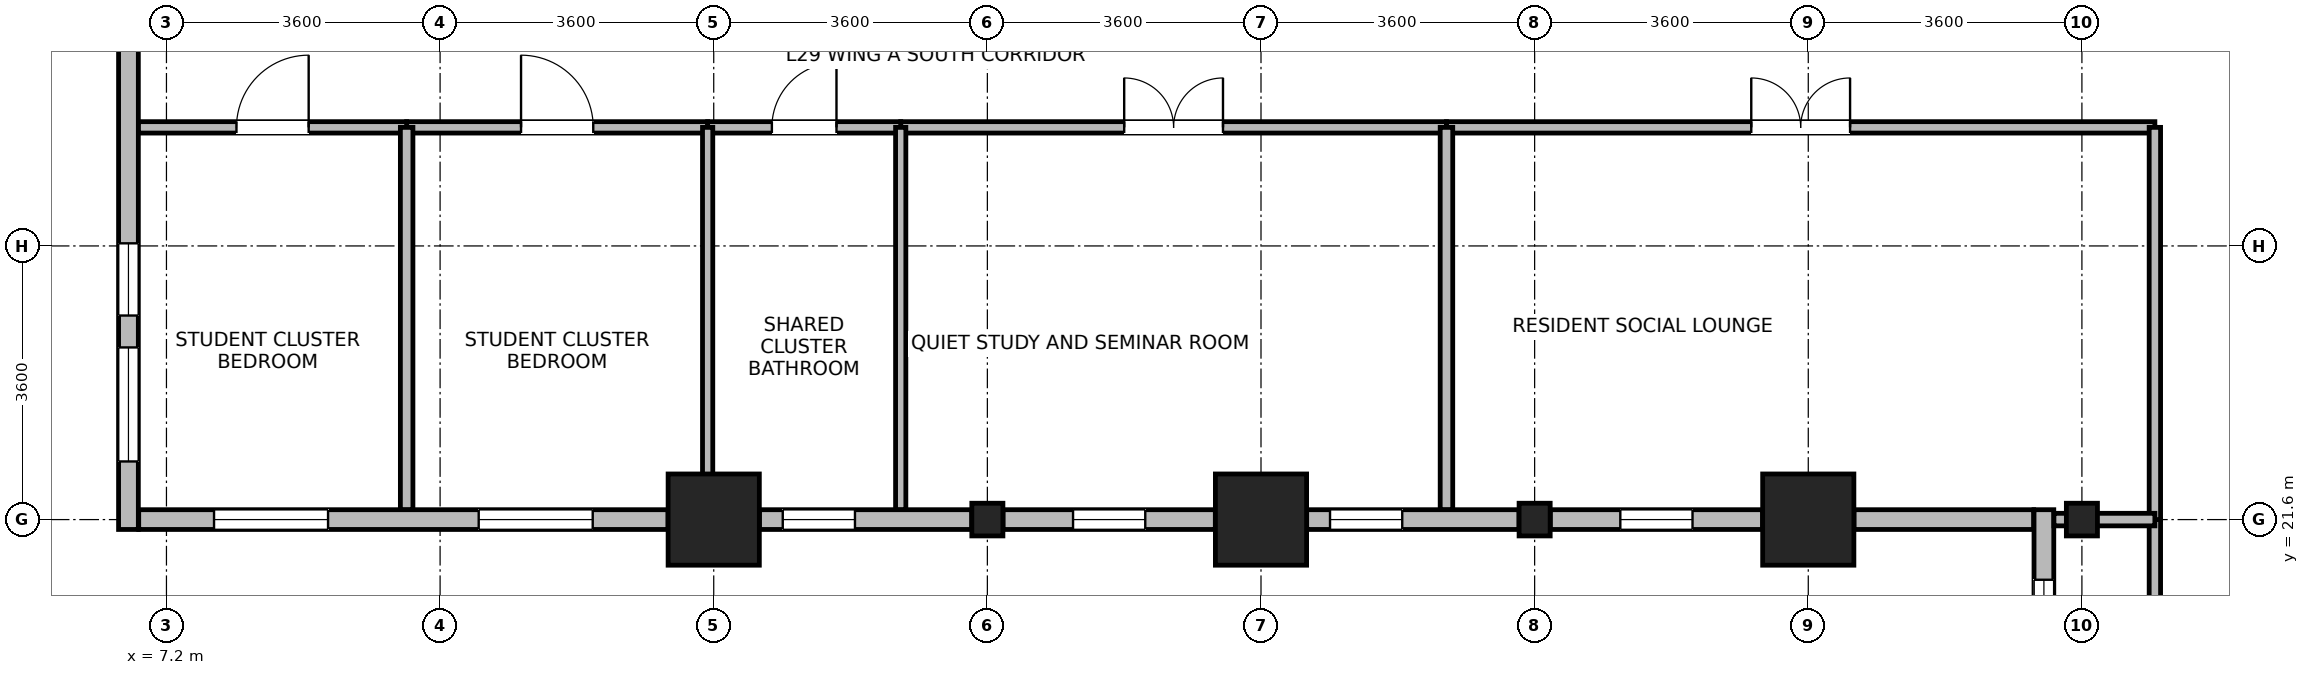
"""IFC4 building model, lengths in metres.
Left out: names, types, materials, properties, quantities, classifications, styles, units other than length and angle.
Written with IfcOpenShell. Run it as: python <this file> out.ifc"""

import sys

from ifc_helpers import new_model, si_unit, direction, frame, frame_2d, origin, origin_2d, place, context, subcontext, project, spatial, rectangle, i_section, extrude, source, transform, mapped, element, fill, save


model = new_model("IFC4")
c1 = context("Model", 3, precision=1e-05, world=origin(), true_north=direction((0.0, 1.0)))
c2 = subcontext(c1, "Body", "Model", "MODEL_VIEW")
j1 = project(units=[si_unit("LENGTHUNIT", "METRE"), si_unit("PLANEANGLEUNIT", "RADIAN")], contexts=[c1])
p1 = place(None, origin())
s1 = spatial("IfcSite", under=j1, at=p1, CompositionType="ELEMENT")
p2 = place(p1, origin())
s2 = spatial("IfcBuilding", under=s1, at=p2, CompositionType="ELEMENT")
p3 = place(p2, frame((0.0, 0.0, 115.6)))
s3 = spatial("IfcBuildingStorey", under=s2, at=p3, CompositionType="ELEMENT", Elevation=115.6)
m1 = source(origin(), c2, "Body", "SweptSolid", [
    extrude(rectangle(XDim=1.2, YDim=1.2, at=origin_2d()), origin(), (0.0, 0.0, 1.0), 3.7),
])
for number, where, z_axis, x_axis in (
    (1, (14.4, 21.6, 0.0), (0.0, 0.0, 1.0), (1.0, 0.0, 0.0)),
    (2, (21.6, 21.6, 0.0), (0.0, 0.0, 1.0), (1.0, 0.0, 0.0)),
    (3, (28.8, 21.6, 0.0), (0.0, 0.0, 1.0), (1.0, 0.0, 0.0)),
):
    element("IfcColumn", number, at=place(p3, frame(where, z_axis=z_axis, x_axis=x_axis)), inside=s3, PredefinedType="COLUMN", context=c2, shape_type="MappedRepresentation", body=[
        mapped(m1, transform((0.0, 0.0, 0.0), x_axis=(1.0, 0.0, 0.0), y_axis=(0.0, 1.0, 0.0), z_axis=(0.0, 0.0, 1.0), scale=1.0)),
    ])
m2 = source(origin(), c2, "Body", "SweptSolid", [
    extrude(i_section(OverallWidth=0.409, OverallDepth=0.43, WebThickness=0.024, FlangeThickness=0.033, FilletRadius=0.015, at=origin_2d()), origin(), (0.0, 0.0, 1.0), 3.7),
])
for number, where, z_axis, x_axis in (
    (4, (18.0, 21.6, 0.0), (0.0, 0.0, 1.0), (1.0, 0.0, 0.0)),
    (5, (25.2, 21.6, 0.0), (0.0, 0.0, 1.0), (1.0, 0.0, 0.0)),
    (6, (32.4, 21.6, 0.0), (0.0, 0.0, 1.0), (1.0, 0.0, 0.0)),
):
    element("IfcColumn", number, at=place(p3, frame(where, z_axis=z_axis, x_axis=x_axis)), inside=s3, PredefinedType="COLUMN", context=c2, shape_type="MappedRepresentation", body=[
        mapped(m2, transform((0.0, 0.0, 0.0), x_axis=(1.0, 0.0, 0.0), y_axis=(0.0, 1.0, 0.0), z_axis=(0.0, 0.0, 1.0), scale=1.0)),
    ])
p4 = place(p3, frame((6.7, 21.47, 0.0), z_axis=(0.0, 0.0, 1.0), x_axis=(0.0, 1.0, 0.0)))
e7 = element("IfcWall", 7, at=p4, inside=s3, PredefinedType="STANDARD", context=c2, shape_type="SweptSolid", body=[
    extrude(rectangle(XDim=6.579, YDim=0.26, at=frame_2d((3.29, 0.0))), origin(), (0.0, 0.0, 1.0), 3.43),
])
p5 = place(p4, frame((0.895, 0.0, 0.85)))
e8 = element("IfcOpeningElement", 8, at=p5, cuts=e7, PredefinedType="OPENING", context=c2, shape_type="SweptSolid", body=[
    extrude(rectangle(XDim=1.5, YDim=1.85, at=frame_2d((0.75, 0.925))), frame((0.0, 0.14, 0.0), z_axis=(0.0, -1.0, 0.0), x_axis=(1.0, 0.0, 0.0)), (0.0, 0.0, 1.0), 0.28),
])
p6 = place(p4, frame((2.814, 0.0, 0.85)))
e9 = element("IfcOpeningElement", 9, at=p6, cuts=e7, PredefinedType="OPENING", context=c2, shape_type="SweptSolid", body=[
    extrude(rectangle(XDim=0.95, YDim=1.75, at=frame_2d((0.475, 0.875))), frame((0.0, 0.14, 0.0), z_axis=(0.0, -1.0, 0.0), x_axis=(1.0, 0.0, 0.0)), (0.0, 0.0, 1.0), 0.28),
])
p7 = place(p3, frame((13.799, 21.6, 0.0), z_axis=(0.0, 0.0, 1.0), x_axis=(-1.0, 0.0, 0.0)))
e10 = element("IfcWall", 10, at=p7, inside=s3, PredefinedType="STANDARD", context=c2, shape_type="SweptSolid", body=[
    extrude(rectangle(XDim=6.964, YDim=0.26, at=frame_2d((3.482, 0.0))), origin(), (0.0, 0.0, 1.0), 3.43),
])
p8 = place(p7, frame((0.991, 0.0, 0.85)))
e11 = element("IfcOpeningElement", 11, at=p8, cuts=e10, PredefinedType="OPENING", context=c2, shape_type="SweptSolid", body=[
    extrude(rectangle(XDim=1.5, YDim=1.85, at=frame_2d((0.75, 0.925))), frame((0.0, 0.14, 0.0), z_axis=(0.0, -1.0, 0.0), x_axis=(1.0, 0.0, 0.0)), (0.0, 0.0, 1.0), 0.28),
])
p9 = place(p7, frame((4.473, 0.0, 0.85)))
e12 = element("IfcOpeningElement", 12, at=p9, cuts=e10, PredefinedType="OPENING", context=c2, shape_type="SweptSolid", body=[
    extrude(rectangle(XDim=1.5, YDim=1.85, at=frame_2d((0.75, 0.925))), frame((0.0, 0.14, 0.0), z_axis=(0.0, -1.0, 0.0), x_axis=(1.0, 0.0, 0.0)), (0.0, 0.0, 1.0), 0.28),
])
p10 = place(p3, frame((17.794, 21.6, 0.0), z_axis=(0.0, 0.0, 1.0), x_axis=(-1.0, 0.0, 0.0)))
e13 = element("IfcWall", 13, at=p10, inside=s3, PredefinedType="STANDARD", context=c2, shape_type="SweptSolid", body=[
    extrude(rectangle(XDim=2.793, YDim=0.26, at=frame_2d((1.397, 0.0))), origin(), (0.0, 0.0, 1.0), 2.98),
])
p11 = place(p10, frame((1.536, 0.0, 0.85)))
e14 = element("IfcOpeningElement", 14, at=p11, cuts=e13, PredefinedType="OPENING", context=c2, shape_type="SweptSolid", body=[
    extrude(rectangle(XDim=0.95, YDim=1.75, at=frame_2d((0.475, 0.875))), frame((0.0, 0.14, 0.0), z_axis=(0.0, -1.0, 0.0), x_axis=(1.0, 0.0, 0.0)), (0.0, 0.0, 1.0), 0.28),
])
p12 = place(p3, frame((20.999, 21.6, 0.0), z_axis=(0.0, 0.0, 1.0), x_axis=(-1.0, 0.0, 0.0)))
e15 = element("IfcWall", 15, at=p12, inside=s3, PredefinedType="STANDARD", context=c2, shape_type="SweptSolid", body=[
    extrude(rectangle(XDim=2.793, YDim=0.26, at=frame_2d((1.397, 0.0))), origin(), (0.0, 0.0, 1.0), 2.98),
])
p13 = place(p12, frame((0.922, 0.0, 0.85)))
e16 = element("IfcOpeningElement", 16, at=p13, cuts=e15, PredefinedType="OPENING", context=c2, shape_type="SweptSolid", body=[
    extrude(rectangle(XDim=0.95, YDim=1.75, at=frame_2d((0.475, 0.875))), frame((0.0, 0.14, 0.0), z_axis=(0.0, -1.0, 0.0), x_axis=(1.0, 0.0, 0.0)), (0.0, 0.0, 1.0), 0.28),
])
p14 = place(p3, frame((24.994, 21.6, 0.0), z_axis=(0.0, 0.0, 1.0), x_axis=(-1.0, 0.0, 0.0)))
e17 = element("IfcWall", 17, at=p14, inside=s3, PredefinedType="STANDARD", context=c2, shape_type="SweptSolid", body=[
    extrude(rectangle(XDim=2.793, YDim=0.26, at=frame_2d((1.397, 0.0))), origin(), (0.0, 0.0, 1.0), 2.98),
])
p15 = place(p14, frame((1.536, 0.0, 0.85)))
e18 = element("IfcOpeningElement", 18, at=p15, cuts=e17, PredefinedType="OPENING", context=c2, shape_type="SweptSolid", body=[
    extrude(rectangle(XDim=0.95, YDim=1.75, at=frame_2d((0.475, 0.875))), frame((0.0, 0.14, 0.0), z_axis=(0.0, -1.0, 0.0), x_axis=(1.0, 0.0, 0.0)), (0.0, 0.0, 1.0), 0.28),
])
p16 = place(p3, frame((28.199, 21.6, 0.0), z_axis=(0.0, 0.0, 1.0), x_axis=(-1.0, 0.0, 0.0)))
e19 = element("IfcWall", 19, at=p16, inside=s3, PredefinedType="STANDARD", context=c2, shape_type="SweptSolid", body=[
    extrude(rectangle(XDim=2.793, YDim=0.26, at=frame_2d((1.397, 0.0))), origin(), (0.0, 0.0, 1.0), 2.98),
])
p17 = place(p16, frame((0.922, 0.0, 0.85)))
e20 = element("IfcOpeningElement", 20, at=p17, cuts=e19, PredefinedType="OPENING", context=c2, shape_type="SweptSolid", body=[
    extrude(rectangle(XDim=0.95, YDim=1.75, at=frame_2d((0.475, 0.875))), frame((0.0, 0.14, 0.0), z_axis=(0.0, -1.0, 0.0), x_axis=(1.0, 0.0, 0.0)), (0.0, 0.0, 1.0), 0.28),
])
p18 = place(p3, frame((31.765, 21.6, 0.0), z_axis=(0.0, 0.0, 1.0), x_axis=(-1.0, 0.0, 0.0)))
e21 = element("IfcWall", 21, at=p18, inside=s3, PredefinedType="STANDARD", context=c2, shape_type="SweptSolid", body=[
    extrude(rectangle(XDim=2.364, YDim=0.26, at=frame_2d((1.182, 0.0))), origin(), (0.0, 0.0, 1.0), 2.98),
])
p19 = place(p3, frame((31.9, 1.67, 0.0), z_axis=(0.0, 0.0, 1.0), x_axis=(0.0, 1.0, 0.0)))
e22 = element("IfcWall", 22, at=p19, inside=s3, PredefinedType="STANDARD", context=c2, shape_type="SweptSolid", body=[
    extrude(rectangle(XDim=20.06, YDim=0.26, at=frame_2d((10.03, 0.0))), origin(), (0.0, 0.0, 1.0), 3.43),
])
p20 = place(p19, frame((0.922, 0.0, 0.85)))
e23 = element("IfcOpeningElement", 23, at=p20, cuts=e22, PredefinedType="OPENING", context=c2, shape_type="SweptSolid", body=[
    extrude(rectangle(XDim=1.5, YDim=1.85, at=frame_2d((0.75, 0.925))), frame((0.0, 0.14, 0.0), z_axis=(0.0, -1.0, 0.0), x_axis=(1.0, 0.0, 0.0)), (0.0, 0.0, 1.0), 0.28),
])
p21 = place(p19, frame((7.608, 0.0, 0.85)))
e24 = element("IfcOpeningElement", 24, at=p21, cuts=e22, PredefinedType="OPENING", context=c2, shape_type="SweptSolid", body=[
    extrude(rectangle(XDim=1.5, YDim=1.85, at=frame_2d((0.75, 0.925))), frame((0.0, 0.14, 0.0), z_axis=(0.0, -1.0, 0.0), x_axis=(1.0, 0.0, 0.0)), (0.0, 0.0, 1.0), 0.28),
])
p22 = place(p19, frame((10.952, 0.0, 0.85)))
e25 = element("IfcOpeningElement", 25, at=p22, cuts=e22, PredefinedType="OPENING", context=c2, shape_type="SweptSolid", body=[
    extrude(rectangle(XDim=1.5, YDim=1.85, at=frame_2d((0.75, 0.925))), frame((0.0, 0.14, 0.0), z_axis=(0.0, -1.0, 0.0), x_axis=(1.0, 0.0, 0.0)), (0.0, 0.0, 1.0), 0.28),
])
p23 = place(p19, frame((14.295, 0.0, 0.85)))
e26 = element("IfcOpeningElement", 26, at=p23, cuts=e22, PredefinedType="OPENING", context=c2, shape_type="SweptSolid", body=[
    extrude(rectangle(XDim=1.5, YDim=1.85, at=frame_2d((0.75, 0.925))), frame((0.0, 0.14, 0.0), z_axis=(0.0, -1.0, 0.0), x_axis=(1.0, 0.0, 0.0)), (0.0, 0.0, 1.0), 0.28),
])
p24 = place(p19, frame((17.638, 0.0, 0.85)))
e27 = element("IfcOpeningElement", 27, at=p24, cuts=e22, PredefinedType="OPENING", context=c2, shape_type="SweptSolid", body=[
    extrude(rectangle(XDim=1.5, YDim=1.85, at=frame_2d((0.75, 0.925))), frame((0.0, 0.14, 0.0), z_axis=(0.0, -1.0, 0.0), x_axis=(1.0, 0.0, 0.0)), (0.0, 0.0, 1.0), 0.28),
])
p25 = place(p3, frame((24.04, 26.76, 0.0), z_axis=(0.0, 0.0, 1.0), x_axis=(1.0, 0.0, 0.0)))
e28 = element("IfcWall", 28, at=p25, inside=s3, PredefinedType="PARTITIONING", context=c2, shape_type="SweptSolid", body=[
    extrude(rectangle(XDim=9.32, YDim=0.15, at=frame_2d((4.66, 0.0))), origin(), (0.0, 0.0, 1.0), 3.43),
])
p26 = place(p25, frame((4.01, 0.0, 0.0)))
e29 = element("IfcOpeningElement", 29, at=p26, cuts=e28, PredefinedType="OPENING", context=c2, shape_type="SweptSolid", body=[
    extrude(rectangle(XDim=1.3, YDim=2.12, at=frame_2d((0.65, 1.06))), frame((0.0, 0.085, 0.0), z_axis=(0.0, -1.0, 0.0), x_axis=(1.0, 0.0, 0.0)), (0.0, 0.0, 1.0), 0.17),
])
p27 = place(p3, frame((16.86, 26.76, 0.0), z_axis=(0.0, 0.0, 1.0), x_axis=(1.0, 0.0, 0.0)))
e30 = element("IfcWall", 30, at=p27, inside=s3, PredefinedType="PARTITIONING", context=c2, shape_type="SweptSolid", body=[
    extrude(rectangle(XDim=7.18, YDim=0.15, at=frame_2d((3.59, 0.0))), origin(), (0.0, 0.0, 1.0), 3.43),
])
p28 = place(p27, frame((2.94, 0.0, 0.0)))
e31 = element("IfcOpeningElement", 31, at=p28, cuts=e30, PredefinedType="OPENING", context=c2, shape_type="SweptSolid", body=[
    extrude(rectangle(XDim=1.3, YDim=2.12, at=frame_2d((0.65, 1.06))), frame((0.0, 0.085, 0.0), z_axis=(0.0, -1.0, 0.0), x_axis=(1.0, 0.0, 0.0)), (0.0, 0.0, 1.0), 0.17),
])
p29 = place(p3, frame((33.36, 14.5, 0.0), z_axis=(0.0, 0.0, 1.0), x_axis=(0.0, 1.0, 0.0)))
e32 = element("IfcWall", 32, at=p29, inside=s3, PredefinedType="PARTITIONING", context=c2, shape_type="SweptSolid", body=[
    extrude(rectangle(XDim=7.1, YDim=0.15, at=frame_2d((3.55, 0.0))), origin(), (0.0, 0.0, 1.0), 3.43),
])
p30 = place(p29, frame((2.9, 0.0, 0.0)))
e33 = element("IfcOpeningElement", 33, at=p30, cuts=e32, PredefinedType="OPENING", context=c2, shape_type="SweptSolid", body=[
    extrude(rectangle(XDim=1.3, YDim=2.12, at=frame_2d((0.65, 1.06))), frame((0.0, 0.085, 0.0), z_axis=(0.0, -1.0, 0.0), x_axis=(1.0, 0.0, 0.0)), (0.0, 0.0, 1.0), 0.17),
])
p31 = place(p3, frame((33.36, 21.6, 0.0), z_axis=(0.0, 0.0, 1.0), x_axis=(0.0, 1.0, 0.0)))
e34 = element("IfcWall", 34, at=p31, inside=s3, PredefinedType="PARTITIONING", context=c2, shape_type="SweptSolid", body=[
    extrude(rectangle(XDim=5.16, YDim=0.15, at=frame_2d((2.58, 0.0))), origin(), (0.0, 0.0, 1.0), 3.43),
])
p32 = place(p3, frame((10.36, 26.76, 0.0), z_axis=(0.0, 0.0, 1.0), x_axis=(1.0, 0.0, 0.0)))
e35 = element("IfcWall", 35, at=p32, inside=s3, PredefinedType="PARTITIONING", context=c2, shape_type="SweptSolid", body=[
    extrude(rectangle(XDim=3.96, YDim=0.15, at=frame_2d((1.98, 0.0))), origin(), (0.0, 0.0, 1.0), 3.43),
])
p33 = place(p32, frame((1.505, 0.0, 0.0)))
e36 = element("IfcOpeningElement", 36, at=p33, cuts=e35, PredefinedType="OPENING", context=c2, shape_type="SweptSolid", body=[
    extrude(rectangle(XDim=0.95, YDim=2.1, at=frame_2d((0.475, 1.05))), frame((0.0, 0.085, 0.0), z_axis=(0.0, -1.0, 0.0), x_axis=(1.0, 0.0, 0.0)), (0.0, 0.0, 1.0), 0.17),
])
p34 = place(p3, frame((6.832, 26.76, 0.0), z_axis=(0.0, 0.0, 1.0), x_axis=(1.0, 0.0, 0.0)))
e37 = element("IfcWall", 37, at=p34, inside=s3, PredefinedType="PARTITIONING", context=c2, shape_type="SweptSolid", body=[
    extrude(rectangle(XDim=3.528, YDim=0.15, at=frame_2d((1.764, 0.0))), origin(), (0.0, 0.0, 1.0), 3.43),
])
p35 = place(p34, frame((1.289, 0.0, 0.0)))
e38 = element("IfcOpeningElement", 38, at=p35, cuts=e37, PredefinedType="OPENING", context=c2, shape_type="SweptSolid", body=[
    extrude(rectangle(XDim=0.95, YDim=2.1, at=frame_2d((0.475, 1.05))), frame((0.0, 0.085, 0.0), z_axis=(0.0, -1.0, 0.0), x_axis=(1.0, 0.0, 0.0)), (0.0, 0.0, 1.0), 0.17),
])
p36 = place(p3, frame((14.32, 26.76, 0.0), z_axis=(0.0, 0.0, 1.0), x_axis=(1.0, 0.0, 0.0)))
e39 = element("IfcWall", 39, at=p36, inside=s3, PredefinedType="PARTITIONING", context=c2, shape_type="SweptSolid", body=[
    extrude(rectangle(XDim=2.54, YDim=0.15, at=frame_2d((1.27, 0.0))), origin(), (0.0, 0.0, 1.0), 3.43),
])
p37 = place(p36, frame((0.845, 0.0, 0.0)))
e40 = element("IfcOpeningElement", 40, at=p37, cuts=e39, PredefinedType="OPENING", context=c2, shape_type="SweptSolid", body=[
    extrude(rectangle(XDim=0.85, YDim=2.04, at=frame_2d((0.425, 1.02))), frame((0.0, 0.085, 0.0), z_axis=(0.0, -1.0, 0.0), x_axis=(1.0, 0.0, 0.0)), (0.0, 0.0, 1.0), 0.17),
])
p38 = place(p3, frame((10.36, 21.732, 0.0), z_axis=(0.0, 0.0, 1.0), x_axis=(0.0, 1.0, 0.0)))
e41 = element("IfcWall", 41, at=p38, inside=s3, PredefinedType="PARTITIONING", context=c2, shape_type="SweptSolid", body=[
    extrude(rectangle(XDim=5.028, YDim=0.165, at=frame_2d((2.514, 0.0))), origin(), (0.0, 0.0, 1.0), 3.43),
])
p39 = place(p3, frame((14.32, 21.732, 0.0), z_axis=(0.0, 0.0, 1.0), x_axis=(0.0, 1.0, 0.0)))
e42 = element("IfcWall", 42, at=p39, inside=s3, PredefinedType="PARTITIONING", context=c2, shape_type="SweptSolid", body=[
    extrude(rectangle(XDim=5.028, YDim=0.135, at=frame_2d((2.514, 0.0))), origin(), (0.0, 0.0, 1.0), 2.93),
])
p40 = place(p3, frame((16.86, 21.732, 0.0), z_axis=(0.0, 0.0, 1.0), x_axis=(0.0, 1.0, 0.0)))
e43 = element("IfcWall", 43, at=p40, inside=s3, PredefinedType="PARTITIONING", context=c2, shape_type="SweptSolid", body=[
    extrude(rectangle(XDim=5.028, YDim=0.135, at=frame_2d((2.514, 0.0))), origin(), (0.0, 0.0, 1.0), 3.43),
])
p41 = place(p3, frame((24.04, 21.732, 0.0), z_axis=(0.0, 0.0, 1.0), x_axis=(0.0, 1.0, 0.0)))
e44 = element("IfcWall", 44, at=p41, inside=s3, PredefinedType="PARTITIONING", context=c2, shape_type="SweptSolid", body=[
    extrude(rectangle(XDim=5.028, YDim=0.165, at=frame_2d((2.514, 0.0))), origin(), (0.0, 0.0, 1.0), 3.43),
])
p42 = place(p3, frame((32.032, 21.6, 0.0), z_axis=(0.0, 0.0, 1.0), x_axis=(1.0, 0.0, 0.0)))
e45 = element("IfcWall", 45, at=p42, inside=s3, PredefinedType="PARTITIONING", context=c2, shape_type="SweptSolid", body=[
    extrude(rectangle(XDim=1.328, YDim=0.165, at=frame_2d((0.664, 0.0))), origin(), (0.0, 0.0, 1.0), 2.98),
])
p43 = place(p5, origin())
e46 = element("IfcWindow", 46, at=p43, inside=s3, PartitioningType="SINGLE_PANEL", PredefinedType="WINDOW", context=c2, shape_type="SweptSolid", body=[
    extrude(rectangle(XDim=1.5, YDim=1.85, at=frame_2d((0.75, 0.925))), frame((0.0, 0.03, 0.0), z_axis=(0.0, -1.0, 0.0), x_axis=(1.0, 0.0, 0.0)), (0.0, 0.0, 1.0), 0.06),
])
fill(e8, e46)
p44 = place(p6, origin())
e47 = element("IfcWindow", 47, at=p44, inside=s3, PartitioningType="SINGLE_PANEL", PredefinedType="WINDOW", context=c2, shape_type="SweptSolid", body=[
    extrude(rectangle(XDim=0.95, YDim=1.75, at=frame_2d((0.475, 0.875))), frame((0.0, 0.03, 0.0), z_axis=(0.0, -1.0, 0.0), x_axis=(1.0, 0.0, 0.0)), (0.0, 0.0, 1.0), 0.06),
])
fill(e9, e47)
p45 = place(p8, origin())
e48 = element("IfcWindow", 48, at=p45, inside=s3, PartitioningType="SINGLE_PANEL", PredefinedType="WINDOW", context=c2, shape_type="SweptSolid", body=[
    extrude(rectangle(XDim=1.5, YDim=1.85, at=frame_2d((0.75, 0.925))), frame((0.0, 0.03, 0.0), z_axis=(0.0, -1.0, 0.0), x_axis=(1.0, 0.0, 0.0)), (0.0, 0.0, 1.0), 0.06),
])
fill(e11, e48)
p46 = place(p9, origin())
e49 = element("IfcWindow", 49, at=p46, inside=s3, PartitioningType="SINGLE_PANEL", PredefinedType="WINDOW", context=c2, shape_type="SweptSolid", body=[
    extrude(rectangle(XDim=1.5, YDim=1.85, at=frame_2d((0.75, 0.925))), frame((0.0, 0.03, 0.0), z_axis=(0.0, -1.0, 0.0), x_axis=(1.0, 0.0, 0.0)), (0.0, 0.0, 1.0), 0.06),
])
fill(e12, e49)
p47 = place(p11, origin())
e50 = element("IfcWindow", 50, at=p47, inside=s3, PartitioningType="SINGLE_PANEL", PredefinedType="WINDOW", context=c2, shape_type="SweptSolid", body=[
    extrude(rectangle(XDim=0.95, YDim=1.75, at=frame_2d((0.475, 0.875))), frame((0.0, 0.03, 0.0), z_axis=(0.0, -1.0, 0.0), x_axis=(1.0, 0.0, 0.0)), (0.0, 0.0, 1.0), 0.06),
])
fill(e14, e50)
p48 = place(p13, origin())
e51 = element("IfcWindow", 51, at=p48, inside=s3, PartitioningType="SINGLE_PANEL", PredefinedType="WINDOW", context=c2, shape_type="SweptSolid", body=[
    extrude(rectangle(XDim=0.95, YDim=1.75, at=frame_2d((0.475, 0.875))), frame((0.0, 0.03, 0.0), z_axis=(0.0, -1.0, 0.0), x_axis=(1.0, 0.0, 0.0)), (0.0, 0.0, 1.0), 0.06),
])
fill(e16, e51)
p49 = place(p15, origin())
e52 = element("IfcWindow", 52, at=p49, inside=s3, PartitioningType="SINGLE_PANEL", PredefinedType="WINDOW", context=c2, shape_type="SweptSolid", body=[
    extrude(rectangle(XDim=0.95, YDim=1.75, at=frame_2d((0.475, 0.875))), frame((0.0, 0.03, 0.0), z_axis=(0.0, -1.0, 0.0), x_axis=(1.0, 0.0, 0.0)), (0.0, 0.0, 1.0), 0.06),
])
fill(e18, e52)
p50 = place(p17, origin())
e53 = element("IfcWindow", 53, at=p50, inside=s3, PartitioningType="SINGLE_PANEL", PredefinedType="WINDOW", context=c2, shape_type="SweptSolid", body=[
    extrude(rectangle(XDim=0.95, YDim=1.75, at=frame_2d((0.475, 0.875))), frame((0.0, 0.03, 0.0), z_axis=(0.0, -1.0, 0.0), x_axis=(1.0, 0.0, 0.0)), (0.0, 0.0, 1.0), 0.06),
])
fill(e20, e53)
p51 = place(p24, origin())
e54 = element("IfcWindow", 54, at=p51, inside=s3, PartitioningType="SINGLE_PANEL", PredefinedType="WINDOW", context=c2, shape_type="SweptSolid", body=[
    extrude(rectangle(XDim=1.5, YDim=1.85, at=frame_2d((0.75, 0.925))), frame((0.0, 0.03, 0.0), z_axis=(0.0, -1.0, 0.0), x_axis=(1.0, 0.0, 0.0)), (0.0, 0.0, 1.0), 0.06),
])
fill(e27, e54)
p52 = place(p26, origin())
e55 = element("IfcDoor", 55, at=p52, inside=s3, OperationType="DOUBLE_DOOR_SINGLE_SWING", PredefinedType="DOOR", context=c2, shape_type="SweptSolid", body=[
    extrude(rectangle(XDim=1.3, YDim=2.12, at=frame_2d((0.65, 1.06))), frame((0.0, 0.025, 0.0), z_axis=(0.0, -1.0, 0.0), x_axis=(1.0, 0.0, 0.0)), (0.0, 0.0, 1.0), 0.05),
])
fill(e29, e55)
p53 = place(p28, origin())
e56 = element("IfcDoor", 56, at=p53, inside=s3, OperationType="DOUBLE_DOOR_SINGLE_SWING", PredefinedType="DOOR", context=c2, shape_type="SweptSolid", body=[
    extrude(rectangle(XDim=1.3, YDim=2.12, at=frame_2d((0.65, 1.06))), frame((0.0, 0.025, 0.0), z_axis=(0.0, -1.0, 0.0), x_axis=(1.0, 0.0, 0.0)), (0.0, 0.0, 1.0), 0.05),
])
fill(e31, e56)
p54 = place(p33, origin())
e57 = element("IfcDoor", 57, at=p54, inside=s3, OperationType="SINGLE_SWING_LEFT", PredefinedType="DOOR", context=c2, shape_type="SweptSolid", body=[
    extrude(rectangle(XDim=0.95, YDim=2.1, at=frame_2d((0.475, 1.05))), frame((0.0, 0.025, 0.0), z_axis=(0.0, -1.0, 0.0), x_axis=(1.0, 0.0, 0.0)), (0.0, 0.0, 1.0), 0.05),
])
fill(e36, e57)
p55 = place(p35, origin())
e58 = element("IfcDoor", 58, at=p55, inside=s3, OperationType="SINGLE_SWING_RIGHT", PredefinedType="DOOR", context=c2, shape_type="SweptSolid", body=[
    extrude(rectangle(XDim=0.95, YDim=2.1, at=frame_2d((0.475, 1.05))), frame((0.0, 0.025, 0.0), z_axis=(0.0, -1.0, 0.0), x_axis=(1.0, 0.0, 0.0)), (0.0, 0.0, 1.0), 0.05),
])
fill(e38, e58)
p56 = place(p37, origin())
e59 = element("IfcDoor", 59, at=p56, inside=s3, OperationType="SINGLE_SWING_RIGHT", PredefinedType="DOOR", context=c2, shape_type="SweptSolid", body=[
    extrude(rectangle(XDim=0.85, YDim=2.04, at=frame_2d((0.425, 1.02))), frame((0.0, 0.025, 0.0), z_axis=(0.0, -1.0, 0.0), x_axis=(1.0, 0.0, 0.0)), (0.0, 0.0, 1.0), 0.05),
])
fill(e40, e59)
save(model, sys.argv[1])
